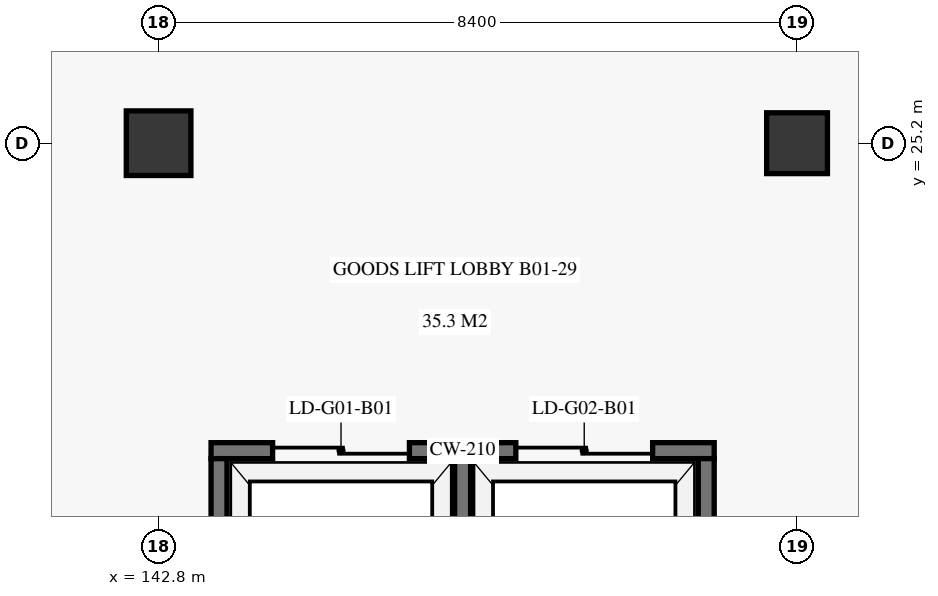
"""IFC4 building model, lengths in metres.
Left out: names, types, materials, properties, quantities, classifications, styles, units other than length and angle.
Written with IfcOpenShell. Run it as: python <this file> out.ifc"""

import sys

from ifc_helpers import new_model, si_unit, direction, frame, frame_2d, origin, origin_2d, place, context, subcontext, project, spatial, rectangle, extrude, element, fill, save


model = new_model("IFC4")
c1 = context("Model", 3, precision=1e-05, world=origin(), true_north=direction((0.0, 1.0)))
c2 = subcontext(c1, "Body", "Model", "MODEL_VIEW")
j1 = project(units=[si_unit("LENGTHUNIT", "METRE"), si_unit("PLANEANGLEUNIT", "RADIAN")], contexts=[c1])
p1 = place(None, origin())
s1 = spatial("IfcSite", under=j1, at=p1, CompositionType="ELEMENT")
p2 = place(p1, origin())
s2 = spatial("IfcBuilding", under=s1, at=p2, CompositionType="ELEMENT")
p3 = place(p2, frame((0.0, 0.0, -4.2)))
s3 = spatial("IfcBuildingStorey", under=s2, at=p3, CompositionType="ELEMENT", Elevation=-4.2)
p4 = place(p3, frame((142.8, 25.2, 0.0), z_axis=(0.0, 0.0, 1.0), x_axis=(1.0, 0.0, 0.0)))
e1 = element("IfcColumn", 1, at=p4, inside=s3, PredefinedType="COLUMN", context=c2, shape_type="SweptSolid", body=[
    extrude(rectangle(XDim=0.85, YDim=0.85, at=origin_2d()), origin(), (0.0, 0.0, 1.0), 3.88),
])
p5 = place(p3, frame((151.2, 25.2, 0.0), z_axis=(0.0, 0.0, 1.0), x_axis=(1.0, 0.0, 0.0)))
e2 = element("IfcColumn", 2, at=p5, inside=s3, PredefinedType="COLUMN", context=c2, shape_type="SweptSolid", body=[
    extrude(rectangle(XDim=0.8, YDim=0.8, at=origin_2d()), origin(), (0.0, 0.0, 1.0), 3.88),
])
p6 = place(p3, frame((143.49, 21.155, 0.0), z_axis=(0.0, 0.0, 1.0), x_axis=(1.0, 0.0, 0.0)))
e3 = element("IfcWall", 3, at=p6, inside=s3, PredefinedType="SHEAR", context=c2, shape_type="SweptSolid", body=[
    extrude(rectangle(XDim=6.62, YDim=0.21, at=frame_2d((3.31, 0.0))), origin(), (0.0, 0.0, 1.0), 3.88),
])
p7 = place(p6, frame((0.81, 0.0, 0.0)))
e4 = element("IfcOpeningElement", 4, at=p7, cuts=e3, PredefinedType="OPENING", context=c2, shape_type="SweptSolid", body=[
    extrude(rectangle(XDim=1.8, YDim=2.45, at=frame_2d((0.9, 1.225))), frame((0.0, 0.115, 0.0), z_axis=(0.0, -1.0, 0.0), x_axis=(1.0, 0.0, 0.0)), (0.0, 0.0, 1.0), 0.23),
])
p8 = place(p6, frame((4.01, 0.0, 0.0)))
e5 = element("IfcOpeningElement", 5, at=p8, cuts=e3, PredefinedType="OPENING", context=c2, shape_type="SweptSolid", body=[
    extrude(rectangle(XDim=1.8, YDim=2.45, at=frame_2d((0.9, 1.225))), frame((0.0, 0.115, 0.0), z_axis=(0.0, -1.0, 0.0), x_axis=(1.0, 0.0, 0.0)), (0.0, 0.0, 1.0), 0.23),
])
for number, where, z_axis, x_axis in (
    (6, (143.595, 17.45, 0.0), (0.0, 0.0, 1.0), (0.0, 1.0, 0.0)),
    (7, (150.005, 17.45, 0.0), (0.0, 0.0, 1.0), (0.0, 1.0, 0.0)),
    (8, (146.8, 17.45, 0.0), (0.0, 0.0, 1.0), (0.0, 1.0, 0.0)),
):
    element("IfcWall", number, at=place(p3, frame(where, z_axis=z_axis, x_axis=x_axis)), inside=s3, PredefinedType="SHEAR", context=c2, shape_type="SweptSolid", body=[
        extrude(rectangle(XDim=3.6, YDim=0.21, at=frame_2d((1.8, 0.0))), origin(), (0.0, 0.0, 1.0), 3.88),
    ])
p9 = place(p7, origin())
e9 = element("IfcDoor", 9, at=p9, inside=s3, OperationType="DOUBLE_DOOR_SLIDING", PredefinedType="DOOR", context=c2, shape_type="SweptSolid", body=[
    extrude(rectangle(XDim=1.8, YDim=2.45, at=frame_2d((0.9, 1.225))), frame((0.0, 0.025, 0.0), z_axis=(0.0, -1.0, 0.0), x_axis=(1.0, 0.0, 0.0)), (0.0, 0.0, 1.0), 0.05),
])
fill(e4, e9)
p10 = place(p8, origin())
e10 = element("IfcDoor", 10, at=p10, inside=s3, OperationType="DOUBLE_DOOR_SLIDING", PredefinedType="DOOR", context=c2, shape_type="SweptSolid", body=[
    extrude(rectangle(XDim=1.8, YDim=2.45, at=frame_2d((0.9, 1.225))), frame((0.0, 0.025, 0.0), z_axis=(0.0, -1.0, 0.0), x_axis=(1.0, 0.0, 0.0)), (0.0, 0.0, 1.0), 0.05),
])
fill(e5, e10)
save(model, sys.argv[1])
